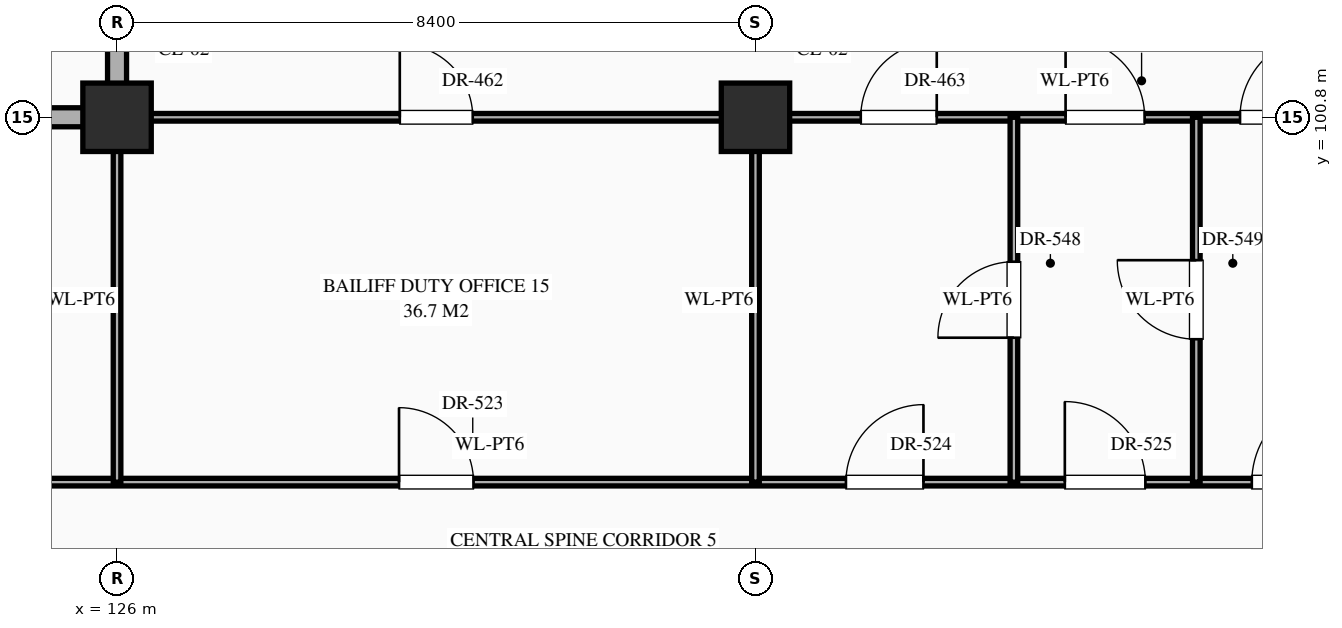
"""IFC4 building model, lengths in metres.
Left out: names, types, materials, properties, quantities, classifications, styles, units other than length and angle.
Written with IfcOpenShell. Run it as: python <this file> out.ifc"""

import sys

from ifc_helpers import new_model, si_unit, direction, frame, frame_2d, origin, origin_2d, place, context, subcontext, project, spatial, rectangle, extrude, element, fill, save


model = new_model("IFC4")
c1 = context("Model", 3, precision=1e-05, world=origin(), true_north=direction((0.0, 1.0)))
c2 = subcontext(c1, "Body", "Model", "MODEL_VIEW")
j1 = project(units=[si_unit("LENGTHUNIT", "METRE"), si_unit("PLANEANGLEUNIT", "RADIAN")], contexts=[c1])
p1 = place(None, origin())
s1 = spatial("IfcSite", under=j1, at=p1, CompositionType="ELEMENT")
p2 = place(p1, origin())
s2 = spatial("IfcBuilding", under=s1, at=p2, CompositionType="ELEMENT")
p3 = place(p2, frame((0.0, 0.0, -5.4)))
s3 = spatial("IfcBuildingStorey", under=s2, at=p3, CompositionType="ELEMENT", Elevation=-5.4)
for number, where, z_axis, x_axis in (
    (1, (126.0, 100.8, 0.0), (0.0, 0.0, 1.0), (1.0, 0.0, 0.0)),
    (2, (134.4, 100.8, 0.0), (0.0, 0.0, 1.0), (1.0, 0.0, 0.0)),
):
    element("IfcColumn", number, at=place(p3, frame(where, z_axis=z_axis, x_axis=x_axis)), inside=s3, PredefinedType="COLUMN", context=c2, shape_type="SweptSolid", body=[
        extrude(rectangle(XDim=0.9, YDim=0.9, at=origin_2d()), origin(), (0.0, 0.0, 1.0), 5.4),
    ])
p4 = place(p3, frame((16.8, 96.0, 0.0), z_axis=(0.0, 0.0, 1.0), x_axis=(1.0, 0.0, 0.0)))
e3 = element("IfcWall", 3, at=p4, inside=s3, PredefinedType="STANDARD", context=c2, shape_type="SweptSolid", body=[
    extrude(rectangle(XDim=134.4, YDim=0.1, at=frame_2d((67.2, 0.0))), origin(), (0.0, 0.0, 1.0), 5.1),
])
p5 = place(p4, frame((3.56, 0.0, 0.0)))
e4 = element("IfcOpeningElement", 4, at=p5, cuts=e3, PredefinedType="OPENING", context=c2, shape_type="SweptSolid", body=[
    extrude(rectangle(XDim=1.28, YDim=2.35, at=frame_2d((0.64, 1.175))), frame((0.0, 0.062, 0.0), z_axis=(0.0, -1.0, 0.0), x_axis=(1.0, 0.0, 0.0)), (0.0, 0.0, 1.0), 0.124),
])
p6 = place(p4, frame((9.63, 0.0, 0.0)))
e5 = element("IfcOpeningElement", 5, at=p6, cuts=e3, PredefinedType="OPENING", context=c2, shape_type="SweptSolid", body=[
    extrude(rectangle(XDim=0.94, YDim=2.3, at=frame_2d((0.47, 1.15))), frame((0.0, 0.062, 0.0), z_axis=(0.0, -1.0, 0.0), x_axis=(1.0, 0.0, 0.0)), (0.0, 0.0, 1.0), 0.124),
])
p7 = place(p4, frame((12.51, 0.0, 0.0)))
e6 = element("IfcOpeningElement", 6, at=p7, cuts=e3, PredefinedType="OPENING", context=c2, shape_type="SweptSolid", body=[
    extrude(rectangle(XDim=0.98, YDim=2.35, at=frame_2d((0.49, 1.175))), frame((0.0, 0.062, 0.0), z_axis=(0.0, -1.0, 0.0), x_axis=(1.0, 0.0, 0.0)), (0.0, 0.0, 1.0), 0.124),
])
p8 = place(p4, frame((14.99, 0.0, 0.0)))
e7 = element("IfcOpeningElement", 7, at=p8, cuts=e3, PredefinedType="OPENING", context=c2, shape_type="SweptSolid", body=[
    extrude(rectangle(XDim=1.02, YDim=2.4, at=frame_2d((0.51, 1.2))), frame((0.0, 0.062, 0.0), z_axis=(0.0, -1.0, 0.0), x_axis=(1.0, 0.0, 0.0)), (0.0, 0.0, 1.0), 0.124),
])
p9 = place(p4, frame((20.47, 0.0, 0.0)))
e8 = element("IfcOpeningElement", 8, at=p9, cuts=e3, PredefinedType="OPENING", context=c2, shape_type="SweptSolid", body=[
    extrude(rectangle(XDim=1.06, YDim=2.4, at=frame_2d((0.53, 1.2))), frame((0.0, 0.062, 0.0), z_axis=(0.0, -1.0, 0.0), x_axis=(1.0, 0.0, 0.0)), (0.0, 0.0, 1.0), 0.124),
])
p10 = place(p4, frame((28.83, 0.0, 0.0)))
e9 = element("IfcOpeningElement", 9, at=p10, cuts=e3, PredefinedType="OPENING", context=c2, shape_type="SweptSolid", body=[
    extrude(rectangle(XDim=1.14, YDim=2.4, at=frame_2d((0.57, 1.2))), frame((0.0, 0.062, 0.0), z_axis=(0.0, -1.0, 0.0), x_axis=(1.0, 0.0, 0.0)), (0.0, 0.0, 1.0), 0.124),
])
p11 = place(p4, frame((34.78, 0.0, 0.0)))
e10 = element("IfcOpeningElement", 10, at=p11, cuts=e3, PredefinedType="OPENING", context=c2, shape_type="SweptSolid", body=[
    extrude(rectangle(XDim=1.04, YDim=2.2, at=frame_2d((0.52, 1.1))), frame((0.0, 0.062, 0.0), z_axis=(0.0, -1.0, 0.0), x_axis=(1.0, 0.0, 0.0)), (0.0, 0.0, 1.0), 0.124),
])
p12 = place(p4, frame((37.66, 0.0, 0.0)))
e11 = element("IfcOpeningElement", 11, at=p12, cuts=e3, PredefinedType="OPENING", context=c2, shape_type="SweptSolid", body=[
    extrude(rectangle(XDim=1.08, YDim=2.25, at=frame_2d((0.54, 1.125))), frame((0.0, 0.062, 0.0), z_axis=(0.0, -1.0, 0.0), x_axis=(1.0, 0.0, 0.0)), (0.0, 0.0, 1.0), 0.124),
])
p13 = place(p4, frame((40.14, 0.0, 0.0)))
e12 = element("IfcOpeningElement", 12, at=p13, cuts=e3, PredefinedType="OPENING", context=c2, shape_type="SweptSolid", body=[
    extrude(rectangle(XDim=1.12, YDim=2.25, at=frame_2d((0.56, 1.125))), frame((0.0, 0.062, 0.0), z_axis=(0.0, -1.0, 0.0), x_axis=(1.0, 0.0, 0.0)), (0.0, 0.0, 1.0), 0.124),
])
p14 = place(p4, frame((45.62, 0.0, 0.0)))
e13 = element("IfcOpeningElement", 13, at=p14, cuts=e3, PredefinedType="OPENING", context=c2, shape_type="SweptSolid", body=[
    extrude(rectangle(XDim=1.16, YDim=2.3, at=frame_2d((0.58, 1.15))), frame((0.0, 0.062, 0.0), z_axis=(0.0, -1.0, 0.0), x_axis=(1.0, 0.0, 0.0)), (0.0, 0.0, 1.0), 0.124),
])
p15 = place(p4, frame((54.0, 0.0, 0.0)))
e14 = element("IfcOpeningElement", 14, at=p15, cuts=e3, PredefinedType="OPENING", context=c2, shape_type="SweptSolid", body=[
    extrude(rectangle(XDim=1.2, YDim=2.35, at=frame_2d((0.6, 1.175))), frame((0.0, 0.062, 0.0), z_axis=(0.0, -1.0, 0.0), x_axis=(1.0, 0.0, 0.0)), (0.0, 0.0, 1.0), 0.124),
])
p16 = place(p4, frame((62.38, 0.0, 0.0)))
e15 = element("IfcOpeningElement", 15, at=p16, cuts=e3, PredefinedType="OPENING", context=c2, shape_type="SweptSolid", body=[
    extrude(rectangle(XDim=1.24, YDim=2.3, at=frame_2d((0.62, 1.15))), frame((0.0, 0.062, 0.0), z_axis=(0.0, -1.0, 0.0), x_axis=(1.0, 0.0, 0.0)), (0.0, 0.0, 1.0), 0.124),
])
p17 = place(p4, frame((68.37, 0.0, 0.0)))
e16 = element("IfcOpeningElement", 16, at=p17, cuts=e3, PredefinedType="OPENING", context=c2, shape_type="SweptSolid", body=[
    extrude(rectangle(XDim=1.06, YDim=2.4, at=frame_2d((0.53, 1.2))), frame((0.0, 0.062, 0.0), z_axis=(0.0, -1.0, 0.0), x_axis=(1.0, 0.0, 0.0)), (0.0, 0.0, 1.0), 0.124),
])
p18 = place(p4, frame((71.23, 0.0, 0.0)))
e17 = element("IfcOpeningElement", 17, at=p18, cuts=e3, PredefinedType="OPENING", context=c2, shape_type="SweptSolid", body=[
    extrude(rectangle(XDim=1.14, YDim=2.4, at=frame_2d((0.57, 1.2))), frame((0.0, 0.062, 0.0), z_axis=(0.0, -1.0, 0.0), x_axis=(1.0, 0.0, 0.0)), (0.0, 0.0, 1.0), 0.124),
])
p19 = place(p4, frame((73.85, 0.0, 0.0)))
e18 = element("IfcOpeningElement", 18, at=p19, cuts=e3, PredefinedType="OPENING", context=c2, shape_type="SweptSolid", body=[
    extrude(rectangle(XDim=0.9, YDim=2.15, at=frame_2d((0.45, 1.075))), frame((0.0, 0.062, 0.0), z_axis=(0.0, -1.0, 0.0), x_axis=(1.0, 0.0, 0.0)), (0.0, 0.0, 1.0), 0.124),
])
p20 = place(p4, frame((79.37, 0.0, 0.0)))
e19 = element("IfcOpeningElement", 19, at=p20, cuts=e3, PredefinedType="OPENING", context=c2, shape_type="SweptSolid", body=[
    extrude(rectangle(XDim=0.86, YDim=2.1, at=frame_2d((0.43, 1.05))), frame((0.0, 0.062, 0.0), z_axis=(0.0, -1.0, 0.0), x_axis=(1.0, 0.0, 0.0)), (0.0, 0.0, 1.0), 0.124),
])
p21 = place(p4, frame((87.74, 0.0, 0.0)))
e20 = element("IfcOpeningElement", 20, at=p21, cuts=e3, PredefinedType="OPENING", context=c2, shape_type="SweptSolid", body=[
    extrude(rectangle(XDim=0.92, YDim=2.15, at=frame_2d((0.46, 1.075))), frame((0.0, 0.062, 0.0), z_axis=(0.0, -1.0, 0.0), x_axis=(1.0, 0.0, 0.0)), (0.0, 0.0, 1.0), 0.124),
])
p22 = place(p4, frame((93.62, 0.0, 0.0)))
e21 = element("IfcOpeningElement", 21, at=p22, cuts=e3, PredefinedType="OPENING", context=c2, shape_type="SweptSolid", body=[
    extrude(rectangle(XDim=0.96, YDim=2.2, at=frame_2d((0.48, 1.1))), frame((0.0, 0.062, 0.0), z_axis=(0.0, -1.0, 0.0), x_axis=(1.0, 0.0, 0.0)), (0.0, 0.0, 1.0), 0.124),
])
p23 = place(p4, frame((96.5, 0.0, 0.0)))
e22 = element("IfcOpeningElement", 22, at=p23, cuts=e3, PredefinedType="OPENING", context=c2, shape_type="SweptSolid", body=[
    extrude(rectangle(XDim=1.0, YDim=2.25, at=frame_2d((0.5, 1.125))), frame((0.0, 0.062, 0.0), z_axis=(0.0, -1.0, 0.0), x_axis=(1.0, 0.0, 0.0)), (0.0, 0.0, 1.0), 0.124),
])
p24 = place(p4, frame((98.98, 0.0, 0.0)))
e23 = element("IfcOpeningElement", 23, at=p24, cuts=e3, PredefinedType="OPENING", context=c2, shape_type="SweptSolid", body=[
    extrude(rectangle(XDim=1.04, YDim=2.2, at=frame_2d((0.52, 1.1))), frame((0.0, 0.062, 0.0), z_axis=(0.0, -1.0, 0.0), x_axis=(1.0, 0.0, 0.0)), (0.0, 0.0, 1.0), 0.124),
])
p25 = place(p4, frame((104.53, 0.0, 0.0)))
e24 = element("IfcOpeningElement", 24, at=p25, cuts=e3, PredefinedType="OPENING", context=c2, shape_type="SweptSolid", body=[
    extrude(rectangle(XDim=0.94, YDim=2.3, at=frame_2d((0.47, 1.15))), frame((0.0, 0.062, 0.0), z_axis=(0.0, -1.0, 0.0), x_axis=(1.0, 0.0, 0.0)), (0.0, 0.0, 1.0), 0.124),
])
p26 = place(p4, frame((112.91, 0.0, 0.0)))
e25 = element("IfcOpeningElement", 25, at=p26, cuts=e3, PredefinedType="OPENING", context=c2, shape_type="SweptSolid", body=[
    extrude(rectangle(XDim=0.98, YDim=2.35, at=frame_2d((0.49, 1.175))), frame((0.0, 0.062, 0.0), z_axis=(0.0, -1.0, 0.0), x_axis=(1.0, 0.0, 0.0)), (0.0, 0.0, 1.0), 0.124),
])
p27 = place(p4, frame((118.79, 0.0, 0.0)))
e26 = element("IfcOpeningElement", 26, at=p27, cuts=e3, PredefinedType="OPENING", context=c2, shape_type="SweptSolid", body=[
    extrude(rectangle(XDim=1.02, YDim=2.4, at=frame_2d((0.51, 1.2))), frame((0.0, 0.062, 0.0), z_axis=(0.0, -1.0, 0.0), x_axis=(1.0, 0.0, 0.0)), (0.0, 0.0, 1.0), 0.124),
])
p28 = place(p4, frame((121.67, 0.0, 0.0)))
e27 = element("IfcOpeningElement", 27, at=p28, cuts=e3, PredefinedType="OPENING", context=c2, shape_type="SweptSolid", body=[
    extrude(rectangle(XDim=1.06, YDim=2.4, at=frame_2d((0.53, 1.2))), frame((0.0, 0.062, 0.0), z_axis=(0.0, -1.0, 0.0), x_axis=(1.0, 0.0, 0.0)), (0.0, 0.0, 1.0), 0.124),
])
p29 = place(p4, frame((124.13, 0.0, 0.0)))
e28 = element("IfcOpeningElement", 28, at=p29, cuts=e3, PredefinedType="OPENING", context=c2, shape_type="SweptSolid", body=[
    extrude(rectangle(XDim=1.14, YDim=2.4, at=frame_2d((0.57, 1.2))), frame((0.0, 0.062, 0.0), z_axis=(0.0, -1.0, 0.0), x_axis=(1.0, 0.0, 0.0)), (0.0, 0.0, 1.0), 0.124),
])
p30 = place(p4, frame((129.75, 0.0, 0.0)))
e29 = element("IfcOpeningElement", 29, at=p30, cuts=e3, PredefinedType="OPENING", context=c2, shape_type="SweptSolid", body=[
    extrude(rectangle(XDim=0.9, YDim=2.15, at=frame_2d((0.45, 1.075))), frame((0.0, 0.062, 0.0), z_axis=(0.0, -1.0, 0.0), x_axis=(1.0, 0.0, 0.0)), (0.0, 0.0, 1.0), 0.124),
])
p31 = place(p3, frame((121.8, 100.8, 0.0), z_axis=(0.0, 0.0, 1.0), x_axis=(1.0, 0.0, 0.0)))
e30 = element("IfcWall", 30, at=p31, inside=s3, PredefinedType="STANDARD", context=c2, shape_type="SweptSolid", body=[
    extrude(rectangle(XDim=4.2, YDim=0.25, at=frame_2d((2.1, 0.0))), origin(), (0.0, 0.0, 1.0), 4.25),
])
p32 = place(p3, frame((126.0, 100.8, 0.0), z_axis=(0.0, 0.0, 1.0), x_axis=(1.0, 0.0, 0.0)))
e31 = element("IfcWall", 31, at=p32, inside=s3, PredefinedType="STANDARD", context=c2, shape_type="SweptSolid", body=[
    extrude(rectangle(XDim=25.2, YDim=0.1, at=frame_2d((12.6, 0.0))), origin(), (0.0, 0.0, 1.0), 4.25),
])
p33 = place(p32, frame((3.72, 0.0, 0.0)))
e32 = element("IfcOpeningElement", 32, at=p33, cuts=e31, PredefinedType="OPENING", context=c2, shape_type="SweptSolid", body=[
    extrude(rectangle(XDim=0.96, YDim=2.2, at=frame_2d((0.48, 1.1))), frame((0.0, 0.062, 0.0), z_axis=(0.0, -1.0, 0.0), x_axis=(1.0, 0.0, 0.0)), (0.0, 0.0, 1.0), 0.124),
])
p34 = place(p32, frame((9.785, 0.0, 0.0)))
e33 = element("IfcOpeningElement", 33, at=p34, cuts=e31, PredefinedType="OPENING", context=c2, shape_type="SweptSolid", body=[
    extrude(rectangle(XDim=1.0, YDim=2.25, at=frame_2d((0.5, 1.125))), frame((0.0, 0.062, 0.0), z_axis=(0.0, -1.0, 0.0), x_axis=(1.0, 0.0, 0.0)), (0.0, 0.0, 1.0), 0.124),
])
p35 = place(p32, frame((12.48, 0.0, 0.0)))
e34 = element("IfcOpeningElement", 34, at=p35, cuts=e31, PredefinedType="OPENING", context=c2, shape_type="SweptSolid", body=[
    extrude(rectangle(XDim=1.04, YDim=2.2, at=frame_2d((0.52, 1.1))), frame((0.0, 0.062, 0.0), z_axis=(0.0, -1.0, 0.0), x_axis=(1.0, 0.0, 0.0)), (0.0, 0.0, 1.0), 0.124),
])
p36 = place(p32, frame((14.775, 0.0, 0.0)))
e35 = element("IfcOpeningElement", 35, at=p36, cuts=e31, PredefinedType="OPENING", context=c2, shape_type="SweptSolid", body=[
    extrude(rectangle(XDim=1.08, YDim=2.25, at=frame_2d((0.54, 1.125))), frame((0.0, 0.062, 0.0), z_axis=(0.0, -1.0, 0.0), x_axis=(1.0, 0.0, 0.0)), (0.0, 0.0, 1.0), 0.124),
])
p37 = place(p32, frame((20.452, 0.0, 0.0)))
e36 = element("IfcOpeningElement", 36, at=p37, cuts=e31, PredefinedType="OPENING", context=c2, shape_type="SweptSolid", body=[
    extrude(rectangle(XDim=1.12, YDim=2.25, at=frame_2d((0.56, 1.125))), frame((0.0, 0.062, 0.0), z_axis=(0.0, -1.0, 0.0), x_axis=(1.0, 0.0, 0.0)), (0.0, 0.0, 1.0), 0.124),
])
p38 = place(p3, frame((126.0, 96.0, 0.0), z_axis=(0.0, 0.0, 1.0), x_axis=(0.0, 1.0, 0.0)))
e37 = element("IfcWall", 37, at=p38, inside=s3, PredefinedType="STANDARD", context=c2, shape_type="SweptSolid", body=[
    extrude(rectangle(XDim=4.8, YDim=0.1, at=frame_2d((2.4, 0.0))), origin(), (0.0, 0.0, 1.0), 4.35),
])
p39 = place(p3, frame((126.0, 100.8, 0.0), z_axis=(0.0, 0.0, 1.0), x_axis=(0.0, 1.0, 0.0)))
e38 = element("IfcWall", 38, at=p39, inside=s3, PredefinedType="STANDARD", context=c2, shape_type="SweptSolid", body=[
    extrude(rectangle(XDim=3.6, YDim=0.25, at=frame_2d((1.8, 0.0))), origin(), (0.0, 0.0, 1.0), 4.35),
])
p40 = place(p39, frame((0.91, 0.0, 0.0)))
e39 = element("IfcOpeningElement", 39, at=p40, cuts=e38, PredefinedType="OPENING", context=c2, shape_type="SweptSolid", body=[
    extrude(rectangle(XDim=0.95, YDim=2.15, at=frame_2d((0.475, 1.075))), frame((0.0, 0.137, 0.0), z_axis=(0.0, -1.0, 0.0), x_axis=(1.0, 0.0, 0.0)), (0.0, 0.0, 1.0), 0.274),
])
p41 = place(p3, frame((134.4, 96.0, 0.0), z_axis=(0.0, 0.0, 1.0), x_axis=(0.0, 1.0, 0.0)))
e40 = element("IfcWall", 40, at=p41, inside=s3, PredefinedType="STANDARD", context=c2, shape_type="SweptSolid", body=[
    extrude(rectangle(XDim=4.8, YDim=0.1, at=frame_2d((2.4, 0.0))), origin(), (0.0, 0.0, 1.0), 4.35),
])
p42 = place(p3, frame((137.8, 96.0, 0.0), z_axis=(0.0, 0.0, 1.0), x_axis=(0.0, 1.0, 0.0)))
e41 = element("IfcWall", 41, at=p42, inside=s3, PredefinedType="STANDARD", context=c2, shape_type="SweptSolid", body=[
    extrude(rectangle(XDim=4.8, YDim=0.1, at=frame_2d((2.4, 0.0))), origin(), (0.0, 0.0, 1.0), 5.1),
])
p43 = place(p42, frame((1.9, 0.0, 0.0)))
e42 = element("IfcOpeningElement", 42, at=p43, cuts=e41, PredefinedType="OPENING", context=c2, shape_type="SweptSolid", body=[
    extrude(rectangle(XDim=1.0, YDim=2.25, at=frame_2d((0.5, 1.125))), frame((0.0, 0.062, 0.0), z_axis=(0.0, -1.0, 0.0), x_axis=(1.0, 0.0, 0.0)), (0.0, 0.0, 1.0), 0.124),
])
p44 = place(p3, frame((140.2, 96.0, 0.0), z_axis=(0.0, 0.0, 1.0), x_axis=(0.0, 1.0, 0.0)))
e43 = element("IfcWall", 43, at=p44, inside=s3, PredefinedType="STANDARD", context=c2, shape_type="SweptSolid", body=[
    extrude(rectangle(XDim=4.8, YDim=0.1, at=frame_2d((2.4, 0.0))), origin(), (0.0, 0.0, 1.0), 5.1),
])
p45 = place(p44, frame((1.88, 0.0, 0.0)))
e44 = element("IfcOpeningElement", 44, at=p45, cuts=e43, PredefinedType="OPENING", context=c2, shape_type="SweptSolid", body=[
    extrude(rectangle(XDim=1.04, YDim=2.2, at=frame_2d((0.52, 1.1))), frame((0.0, 0.062, 0.0), z_axis=(0.0, -1.0, 0.0), x_axis=(1.0, 0.0, 0.0)), (0.0, 0.0, 1.0), 0.124),
])
p46 = place(p33, origin())
e45 = element("IfcDoor", 45, at=p46, inside=s3, OperationType="SINGLE_SWING_LEFT", PredefinedType="DOOR", context=c2, shape_type="SweptSolid", body=[
    extrude(rectangle(XDim=0.96, YDim=2.2, at=frame_2d((0.48, 1.1))), frame((0.0, 0.025, 0.0), z_axis=(0.0, -1.0, 0.0), x_axis=(1.0, 0.0, 0.0)), (0.0, 0.0, 1.0), 0.05),
])
fill(e32, e45)
p47 = place(p34, origin())
e46 = element("IfcDoor", 46, at=p47, inside=s3, OperationType="SINGLE_SWING_RIGHT", PredefinedType="DOOR", context=c2, shape_type="SweptSolid", body=[
    extrude(rectangle(XDim=1.0, YDim=2.25, at=frame_2d((0.5, 1.125))), frame((0.0, 0.025, 0.0), z_axis=(0.0, -1.0, 0.0), x_axis=(1.0, 0.0, 0.0)), (0.0, 0.0, 1.0), 0.05),
])
fill(e33, e46)
p48 = place(p35, origin())
e47 = element("IfcDoor", 47, at=p48, inside=s3, OperationType="SINGLE_SWING_LEFT", PredefinedType="DOOR", context=c2, shape_type="SweptSolid", body=[
    extrude(rectangle(XDim=1.04, YDim=2.2, at=frame_2d((0.52, 1.1))), frame((0.0, 0.025, 0.0), z_axis=(0.0, -1.0, 0.0), x_axis=(1.0, 0.0, 0.0)), (0.0, 0.0, 1.0), 0.05),
])
fill(e34, e47)
p49 = place(p36, origin())
e48 = element("IfcDoor", 48, at=p49, inside=s3, OperationType="SINGLE_SWING_RIGHT", PredefinedType="DOOR", context=c2, shape_type="SweptSolid", body=[
    extrude(rectangle(XDim=1.08, YDim=2.25, at=frame_2d((0.54, 1.125))), frame((0.0, 0.025, 0.0), z_axis=(0.0, -1.0, 0.0), x_axis=(1.0, 0.0, 0.0)), (0.0, 0.0, 1.0), 0.05),
])
fill(e35, e48)
p50 = place(p26, origin())
e49 = element("IfcDoor", 49, at=p50, inside=s3, OperationType="SINGLE_SWING_LEFT", PredefinedType="DOOR", context=c2, shape_type="SweptSolid", body=[
    extrude(rectangle(XDim=0.98, YDim=2.35, at=frame_2d((0.49, 1.175))), frame((0.0, 0.025, 0.0), z_axis=(0.0, -1.0, 0.0), x_axis=(1.0, 0.0, 0.0)), (0.0, 0.0, 1.0), 0.05),
])
fill(e25, e49)
p51 = place(p27, origin())
e50 = element("IfcDoor", 50, at=p51, inside=s3, OperationType="SINGLE_SWING_RIGHT", PredefinedType="DOOR", context=c2, shape_type="SweptSolid", body=[
    extrude(rectangle(XDim=1.02, YDim=2.4, at=frame_2d((0.51, 1.2))), frame((0.0, 0.025, 0.0), z_axis=(0.0, -1.0, 0.0), x_axis=(1.0, 0.0, 0.0)), (0.0, 0.0, 1.0), 0.05),
])
fill(e26, e50)
p52 = place(p28, origin())
e51 = element("IfcDoor", 51, at=p52, inside=s3, OperationType="SINGLE_SWING_LEFT", PredefinedType="DOOR", context=c2, shape_type="SweptSolid", body=[
    extrude(rectangle(XDim=1.06, YDim=2.4, at=frame_2d((0.53, 1.2))), frame((0.0, 0.025, 0.0), z_axis=(0.0, -1.0, 0.0), x_axis=(1.0, 0.0, 0.0)), (0.0, 0.0, 1.0), 0.05),
])
fill(e27, e51)
p53 = place(p29, origin())
e52 = element("IfcDoor", 52, at=p53, inside=s3, OperationType="SINGLE_SWING_RIGHT", PredefinedType="DOOR", context=c2, shape_type="SweptSolid", body=[
    extrude(rectangle(XDim=1.14, YDim=2.4, at=frame_2d((0.57, 1.2))), frame((0.0, 0.025, 0.0), z_axis=(0.0, -1.0, 0.0), x_axis=(1.0, 0.0, 0.0)), (0.0, 0.0, 1.0), 0.05),
])
fill(e28, e52)
p54 = place(p43, origin())
e53 = element("IfcDoor", 53, at=p54, inside=s3, OperationType="SINGLE_SWING_LEFT", PredefinedType="DOOR", context=c2, shape_type="SweptSolid", body=[
    extrude(rectangle(XDim=1.0, YDim=2.25, at=frame_2d((0.5, 1.125))), frame((0.0, 0.025, 0.0), z_axis=(0.0, -1.0, 0.0), x_axis=(1.0, 0.0, 0.0)), (0.0, 0.0, 1.0), 0.05),
])
fill(e42, e53)
p55 = place(p45, origin())
e54 = element("IfcDoor", 54, at=p55, inside=s3, OperationType="SINGLE_SWING_RIGHT", PredefinedType="DOOR", context=c2, shape_type="SweptSolid", body=[
    extrude(rectangle(XDim=1.04, YDim=2.2, at=frame_2d((0.52, 1.1))), frame((0.0, 0.025, 0.0), z_axis=(0.0, -1.0, 0.0), x_axis=(1.0, 0.0, 0.0)), (0.0, 0.0, 1.0), 0.05),
])
fill(e44, e54)
save(model, sys.argv[1])
